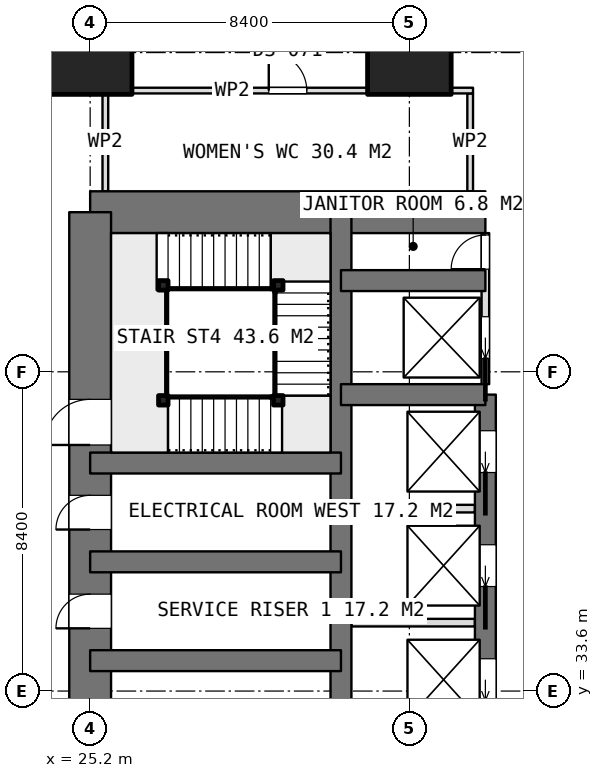
"""IFC4 building model, lengths in metres.
Left out: names, types, materials, properties, quantities, classifications, styles, units other than length and angle.
Written with IfcOpenShell. Run it as: python <this file> out.ifc"""

import sys

from ifc_helpers import new_model, si_unit, direction, frame, frame_2d, origin, origin_2d, place, context, subcontext, project, spatial, rectangle, extrude, element, fill, save


model = new_model("IFC4")
c1 = context("Model", 3, precision=1e-05, world=origin(), true_north=direction((0.0, 1.0)))
c2 = subcontext(c1, "Body", "Model", "MODEL_VIEW")
j1 = project(units=[si_unit("LENGTHUNIT", "METRE"), si_unit("PLANEANGLEUNIT", "RADIAN")], contexts=[c1])
p1 = place(None, origin())
s1 = spatial("IfcSite", under=j1, at=p1, CompositionType="ELEMENT")
p2 = place(p1, origin())
s2 = spatial("IfcBuilding", under=s1, at=p2, CompositionType="ELEMENT")
p3 = place(p2, frame((0.0, 0.0, 62.9)))
s3 = spatial("IfcBuildingStorey", under=s2, at=p3, CompositionType="ELEMENT", Elevation=62.9)
p4 = place(p3, frame((25.2, 46.2, 0.0), z_axis=(0.0, 0.0, 1.0), x_axis=(1.0, 0.0, 0.0)))
e1 = element("IfcWall", 1, at=p4, inside=s3, PredefinedType="SHEAR", context=c2, shape_type="SweptSolid", body=[
    extrude(rectangle(XDim=10.4, YDim=1.1, at=frame_2d((5.2, 0.0))), origin(), (0.0, 0.0, 1.0), 3.75),
])
p5 = place(p3, frame((25.2, 21.0, 0.0), z_axis=(0.0, 0.0, 1.0), x_axis=(0.0, 1.0, 0.0)))
e2 = element("IfcWall", 2, at=p5, inside=s3, PredefinedType="SHEAR", context=c2, shape_type="SweptSolid", body=[
    extrude(rectangle(XDim=25.2, YDim=1.1, at=frame_2d((12.6, 0.0))), origin(), (0.0, 0.0, 1.0), 3.75),
])
p6 = place(p5, frame((7.8, 0.0, 0.0)))
e3 = element("IfcOpeningElement", 3, at=p6, cuts=e2, PredefinedType="OPENING", context=c2, shape_type="SweptSolid", body=[
    extrude(rectangle(XDim=1.2, YDim=2.1, at=frame_2d((0.6, 1.05))), frame((0.0, 0.56, 0.0), z_axis=(0.0, -1.0, 0.0), x_axis=(1.0, 0.0, 0.0)), (0.0, 0.0, 1.0), 1.12),
])
p7 = place(p5, frame((14.25, 0.0, 0.0)))
e4 = element("IfcOpeningElement", 4, at=p7, cuts=e2, PredefinedType="OPENING", context=c2, shape_type="SweptSolid", body=[
    extrude(rectangle(XDim=0.9, YDim=2.1, at=frame_2d((0.45, 1.05))), frame((0.0, 0.56, 0.0), z_axis=(0.0, -1.0, 0.0), x_axis=(1.0, 0.0, 0.0)), (0.0, 0.0, 1.0), 1.12),
])
p8 = place(p5, frame((16.85, 0.0, 0.0)))
e5 = element("IfcOpeningElement", 5, at=p8, cuts=e2, PredefinedType="OPENING", context=c2, shape_type="SweptSolid", body=[
    extrude(rectangle(XDim=0.9, YDim=2.1, at=frame_2d((0.45, 1.05))), frame((0.0, 0.56, 0.0), z_axis=(0.0, -1.0, 0.0), x_axis=(1.0, 0.0, 0.0)), (0.0, 0.0, 1.0), 1.12),
])
p9 = place(p5, frame((19.075, 0.0, 0.0)))
e6 = element("IfcOpeningElement", 6, at=p9, cuts=e2, PredefinedType="OPENING", context=c2, shape_type="SweptSolid", body=[
    extrude(rectangle(XDim=1.2, YDim=2.1, at=frame_2d((0.6, 1.05))), frame((0.0, 0.56, 0.0), z_axis=(0.0, -1.0, 0.0), x_axis=(1.0, 0.0, 0.0)), (0.0, 0.0, 1.0), 1.12),
])
p10 = place(p3, frame((31.8, 21.0, 0.0), z_axis=(0.0, 0.0, 1.0), x_axis=(0.0, 1.0, 0.0)))
e7 = element("IfcWall", 7, at=p10, inside=s3, PredefinedType="SHEAR", context=c2, shape_type="SweptSolid", body=[
    extrude(rectangle(XDim=25.2, YDim=0.55, at=frame_2d((12.6, 0.0))), origin(), (0.0, 0.0, 1.0), 3.75),
])
p11 = place(p3, frame((35.6, 23.4, 0.0), z_axis=(0.0, 0.0, 1.0), x_axis=(0.0, 1.0, 0.0)))
e8 = element("IfcWall", 8, at=p11, inside=s3, PredefinedType="SHEAR", context=c2, shape_type="SweptSolid", body=[
    extrude(rectangle(XDim=18.0, YDim=0.55, at=frame_2d((9.0, 0.0))), origin(), (0.0, 0.0, 1.0), 3.75),
])
p12 = place(p11, frame((0.95, 0.0, 0.0)))
e9 = element("IfcOpeningElement", 9, at=p12, cuts=e8, PredefinedType="OPENING", context=c2, shape_type="SweptSolid", body=[
    extrude(rectangle(XDim=1.1, YDim=2.1, at=frame_2d((0.55, 1.05))), frame((0.0, 0.285, 0.0), z_axis=(0.0, -1.0, 0.0), x_axis=(1.0, 0.0, 0.0)), (0.0, 0.0, 1.0), 0.57),
])
p13 = place(p11, frame((3.95, 0.0, 0.0)))
e10 = element("IfcOpeningElement", 10, at=p13, cuts=e8, PredefinedType="OPENING", context=c2, shape_type="SweptSolid", body=[
    extrude(rectangle(XDim=1.1, YDim=2.1, at=frame_2d((0.55, 1.05))), frame((0.0, 0.285, 0.0), z_axis=(0.0, -1.0, 0.0), x_axis=(1.0, 0.0, 0.0)), (0.0, 0.0, 1.0), 0.57),
])
p14 = place(p11, frame((6.95, 0.0, 0.0)))
e11 = element("IfcOpeningElement", 11, at=p14, cuts=e8, PredefinedType="OPENING", context=c2, shape_type="SweptSolid", body=[
    extrude(rectangle(XDim=1.1, YDim=2.1, at=frame_2d((0.55, 1.05))), frame((0.0, 0.285, 0.0), z_axis=(0.0, -1.0, 0.0), x_axis=(1.0, 0.0, 0.0)), (0.0, 0.0, 1.0), 0.57),
])
p15 = place(p11, frame((9.95, 0.0, 0.0)))
e12 = element("IfcOpeningElement", 12, at=p15, cuts=e8, PredefinedType="OPENING", context=c2, shape_type="SweptSolid", body=[
    extrude(rectangle(XDim=1.1, YDim=2.1, at=frame_2d((0.55, 1.05))), frame((0.0, 0.285, 0.0), z_axis=(0.0, -1.0, 0.0), x_axis=(1.0, 0.0, 0.0)), (0.0, 0.0, 1.0), 0.57),
])
p16 = place(p11, frame((12.95, 0.0, 0.0)))
e13 = element("IfcOpeningElement", 13, at=p16, cuts=e8, PredefinedType="OPENING", context=c2, shape_type="SweptSolid", body=[
    extrude(rectangle(XDim=1.1, YDim=2.1, at=frame_2d((0.55, 1.05))), frame((0.0, 0.285, 0.0), z_axis=(0.0, -1.0, 0.0), x_axis=(1.0, 0.0, 0.0)), (0.0, 0.0, 1.0), 0.57),
])
p17 = place(p11, frame((15.95, 0.0, 0.0)))
e14 = element("IfcOpeningElement", 14, at=p17, cuts=e8, PredefinedType="OPENING", context=c2, shape_type="SweptSolid", body=[
    extrude(rectangle(XDim=1.1, YDim=2.1, at=frame_2d((0.55, 1.05))), frame((0.0, 0.285, 0.0), z_axis=(0.0, -1.0, 0.0), x_axis=(1.0, 0.0, 0.0)), (0.0, 0.0, 1.0), 0.57),
])
for number, where, z_axis, x_axis in (
    (15, (31.8, 41.4, 0.0), (0.0, 0.0, 1.0), (1.0, 0.0, 0.0)),
    (16, (31.8, 44.4, 0.0), (0.0, 0.0, 1.0), (1.0, 0.0, 0.0)),
):
    element("IfcWall", number, at=place(p3, frame(where, z_axis=z_axis, x_axis=x_axis)), inside=s3, PredefinedType="SHEAR", context=c2, shape_type="SweptSolid", body=[
        extrude(rectangle(XDim=3.8, YDim=0.55, at=frame_2d((1.9, 0.0))), origin(), (0.0, 0.0, 1.0), 3.75),
    ])
for number, where, z_axis, x_axis in (
    (17, (25.2, 34.4, 0.0), (0.0, 0.0, 1.0), (1.0, 0.0, 0.0)),
    (18, (25.2, 37.0, 0.0), (0.0, 0.0, 1.0), (1.0, 0.0, 0.0)),
    (19, (25.2, 39.6, 0.0), (0.0, 0.0, 1.0), (1.0, 0.0, 0.0)),
):
    element("IfcWall", number, at=place(p3, frame(where, z_axis=z_axis, x_axis=x_axis)), inside=s3, PredefinedType="SHEAR", context=c2, shape_type="SweptSolid", body=[
        extrude(rectangle(XDim=6.6, YDim=0.55, at=frame_2d((3.3, 0.0))), origin(), (0.0, 0.0, 1.0), 3.75),
    ])
for number, where, z_axis, x_axis in (
    (20, (25.2, 50.4, 0.0), (0.0, 0.0, 1.0), (1.0, 0.0, 0.0)),
    (21, (33.6, 50.4, 0.0), (0.0, 0.0, 1.0), (1.0, 0.0, 0.0)),
):
    element("IfcColumn", number, at=place(p3, frame(where, z_axis=z_axis, x_axis=x_axis)), inside=s3, PredefinedType="COLUMN", context=c2, shape_type="SweptSolid", body=[
        extrude(rectangle(XDim=2.2, YDim=2.2, at=origin_2d()), origin(), (0.0, 0.0, 1.0), 3.75),
    ])
for number, where, z_axis, x_axis in (
    (22, (32.075, 35.4, 0.0), (0.0, 0.0, 1.0), (1.0, 0.0, 0.0)),
    (23, (32.075, 38.4, 0.0), (0.0, 0.0, 1.0), (1.0, 0.0, 0.0)),
):
    element("IfcWall", number, at=place(p3, frame(where, z_axis=z_axis, x_axis=x_axis)), inside=s3, PredefinedType="PARTITIONING", context=c2, shape_type="SweptSolid", body=[
        extrude(rectangle(XDim=3.25, YDim=0.2, at=frame_2d((1.625, 0.0))), origin(), (0.0, 0.0, 1.0), 3.5),
    ])
p18 = place(p3, frame((35.6, 41.675, 0.0), z_axis=(0.0, 0.0, 1.0), x_axis=(0.0, 1.0, 0.0)))
e24 = element("IfcWall", 24, at=p18, inside=s3, PredefinedType="PARTITIONING", context=c2, shape_type="SweptSolid", body=[
    extrude(rectangle(XDim=3.975, YDim=0.2, at=frame_2d((1.987, 0.0))), origin(), (0.0, 0.0, 1.0), 3.5),
])
p19 = place(p18, frame((3.025, 0.0, 0.0)))
e25 = element("IfcOpeningElement", 25, at=p19, cuts=e24, PredefinedType="OPENING", context=c2, shape_type="SweptSolid", body=[
    extrude(rectangle(XDim=0.9, YDim=2.1, at=frame_2d((0.45, 1.05))), frame((0.0, 0.11, 0.0), z_axis=(0.0, -1.0, 0.0), x_axis=(1.0, 0.0, 0.0)), (0.0, 0.0, 1.0), 0.22),
])
p20 = place(p18, frame((0.675, 0.0, 0.0)))
e26 = element("IfcOpeningElement", 26, at=p20, cuts=e24, PredefinedType="OPENING", context=c2, shape_type="SweptSolid", body=[
    extrude(rectangle(XDim=1.1, YDim=2.1, at=frame_2d((0.55, 1.05))), frame((0.0, 0.11, 0.0), z_axis=(0.0, -1.0, 0.0), x_axis=(1.0, 0.0, 0.0)), (0.0, 0.0, 1.0), 0.22),
])
p21 = place(p3, frame((25.525, 49.4, 0.0), z_axis=(0.0, 0.0, 1.0), x_axis=(1.0, 0.0, 0.0)))
e27 = element("IfcWall", 27, at=p21, inside=s3, PredefinedType="PARTITIONING", context=c2, shape_type="SweptSolid", body=[
    extrude(rectangle(XDim=9.75, YDim=0.15, at=frame_2d((4.875, 0.0))), origin(), (0.0, 0.0, 1.0), 3.5),
])
p22 = place(p21, frame((4.375, 0.0, 0.0)))
e28 = element("IfcOpeningElement", 28, at=p22, cuts=e27, PredefinedType="OPENING", context=c2, shape_type="SweptSolid", body=[
    extrude(rectangle(XDim=1.0, YDim=2.1, at=frame_2d((0.5, 1.05))), frame((0.0, 0.085, 0.0), z_axis=(0.0, -1.0, 0.0), x_axis=(1.0, 0.0, 0.0)), (0.0, 0.0, 1.0), 0.17),
])
for number, where, z_axis, x_axis in (
    (29, (25.6, 46.75, 0.0), (0.0, 0.0, 1.0), (0.0, 1.0, 0.0)),
    (30, (35.2, 46.75, 0.0), (0.0, 0.0, 1.0), (0.0, 1.0, 0.0)),
):
    element("IfcWall", number, at=place(p3, frame(where, z_axis=z_axis, x_axis=x_axis)), inside=s3, PredefinedType="PARTITIONING", context=c2, shape_type="SweptSolid", body=[
        extrude(rectangle(XDim=2.575, YDim=0.15, at=frame_2d((1.288, 0.0))), origin(), (0.0, 0.0, 1.0), 3.5),
    ])
for number, where, z_axis, x_axis in (
    (31, (27.125, 41.25, 0.0), (0.0, 0.0, 1.0), (1.0, 0.0, 0.0)),
    (32, (30.15, 41.25, 0.0), (0.0, 0.0, 1.0), (1.0, 0.0, 0.0)),
    (33, (30.15, 44.275, 0.0), (0.0, 0.0, 1.0), (1.0, 0.0, 0.0)),
    (34, (27.125, 44.275, 0.0), (0.0, 0.0, 1.0), (1.0, 0.0, 0.0)),
):
    element("IfcColumn", number, at=place(p3, frame(where, z_axis=z_axis, x_axis=x_axis)), inside=s3, PredefinedType="COLUMN", context=c2, shape_type="SweptSolid", body=[
        extrude(rectangle(XDim=0.25, YDim=0.25, at=origin_2d()), origin(), (0.0, 0.0, 1.0), 3.75),
    ])
p23 = place(p7, origin())
e35 = element("IfcDoor", 35, at=p23, inside=s3, OperationType="SINGLE_SWING_LEFT", PredefinedType="DOOR", context=c2, shape_type="SweptSolid", body=[
    extrude(rectangle(XDim=0.9, YDim=2.1, at=frame_2d((0.45, 1.05))), frame((0.0, 0.025, 0.0), z_axis=(0.0, -1.0, 0.0), x_axis=(1.0, 0.0, 0.0)), (0.0, 0.0, 1.0), 0.05),
])
fill(e4, e35)
p24 = place(p8, origin())
e36 = element("IfcDoor", 36, at=p24, inside=s3, OperationType="SINGLE_SWING_LEFT", PredefinedType="DOOR", context=c2, shape_type="SweptSolid", body=[
    extrude(rectangle(XDim=0.9, YDim=2.1, at=frame_2d((0.45, 1.05))), frame((0.0, 0.025, 0.0), z_axis=(0.0, -1.0, 0.0), x_axis=(1.0, 0.0, 0.0)), (0.0, 0.0, 1.0), 0.05),
])
fill(e5, e36)
p25 = place(p19, origin())
e37 = element("IfcDoor", 37, at=p25, inside=s3, OperationType="SINGLE_SWING_LEFT", PredefinedType="DOOR", context=c2, shape_type="SweptSolid", body=[
    extrude(rectangle(XDim=0.9, YDim=2.1, at=frame_2d((0.45, 1.05))), frame((0.0, 0.025, 0.0), z_axis=(0.0, -1.0, 0.0), x_axis=(1.0, 0.0, 0.0)), (0.0, 0.0, 1.0), 0.05),
])
fill(e25, e37)
p26 = place(p15, origin())
e38 = element("IfcDoor", 38, at=p26, inside=s3, OperationType="SLIDING_TO_LEFT", PredefinedType="USERDEFINED", context=c2, shape_type="SweptSolid", body=[
    extrude(rectangle(XDim=1.1, YDim=2.1, at=frame_2d((0.55, 1.05))), frame((0.0, 0.025, 0.0), z_axis=(0.0, -1.0, 0.0), x_axis=(1.0, 0.0, 0.0)), (0.0, 0.0, 1.0), 0.05),
])
fill(e12, e38)
p27 = place(p16, origin())
e39 = element("IfcDoor", 39, at=p27, inside=s3, OperationType="SLIDING_TO_LEFT", PredefinedType="USERDEFINED", context=c2, shape_type="SweptSolid", body=[
    extrude(rectangle(XDim=1.1, YDim=2.1, at=frame_2d((0.55, 1.05))), frame((0.0, 0.025, 0.0), z_axis=(0.0, -1.0, 0.0), x_axis=(1.0, 0.0, 0.0)), (0.0, 0.0, 1.0), 0.05),
])
fill(e13, e39)
p28 = place(p17, origin())
e40 = element("IfcDoor", 40, at=p28, inside=s3, OperationType="SLIDING_TO_LEFT", PredefinedType="USERDEFINED", context=c2, shape_type="SweptSolid", body=[
    extrude(rectangle(XDim=1.1, YDim=2.1, at=frame_2d((0.55, 1.05))), frame((0.0, 0.025, 0.0), z_axis=(0.0, -1.0, 0.0), x_axis=(1.0, 0.0, 0.0)), (0.0, 0.0, 1.0), 0.05),
])
fill(e14, e40)
p29 = place(p20, origin())
e41 = element("IfcDoor", 41, at=p29, inside=s3, OperationType="SLIDING_TO_LEFT", PredefinedType="USERDEFINED", context=c2, shape_type="SweptSolid", body=[
    extrude(rectangle(XDim=1.1, YDim=2.1, at=frame_2d((0.55, 1.05))), frame((0.0, 0.025, 0.0), z_axis=(0.0, -1.0, 0.0), x_axis=(1.0, 0.0, 0.0)), (0.0, 0.0, 1.0), 0.05),
])
fill(e26, e41)
p30 = place(p22, origin())
e42 = element("IfcDoor", 42, at=p30, inside=s3, OperationType="SINGLE_SWING_LEFT", PredefinedType="DOOR", context=c2, shape_type="SweptSolid", body=[
    extrude(rectangle(XDim=1.0, YDim=2.1, at=frame_2d((0.5, 1.05))), frame((0.0, 0.025, 0.0), z_axis=(0.0, -1.0, 0.0), x_axis=(1.0, 0.0, 0.0)), (0.0, 0.0, 1.0), 0.05),
])
fill(e28, e42)
p31 = place(p9, origin())
e43 = element("IfcDoor", 43, at=p31, inside=s3, OperationType="SINGLE_SWING_RIGHT", PredefinedType="DOOR", context=c2, shape_type="SweptSolid", body=[
    extrude(rectangle(XDim=1.2, YDim=2.1, at=frame_2d((0.6, 1.05))), frame((0.0, 0.025, 0.0), z_axis=(0.0, -1.0, 0.0), x_axis=(1.0, 0.0, 0.0)), (0.0, 0.0, 1.0), 0.05),
])
fill(e6, e43)
save(model, sys.argv[1])
